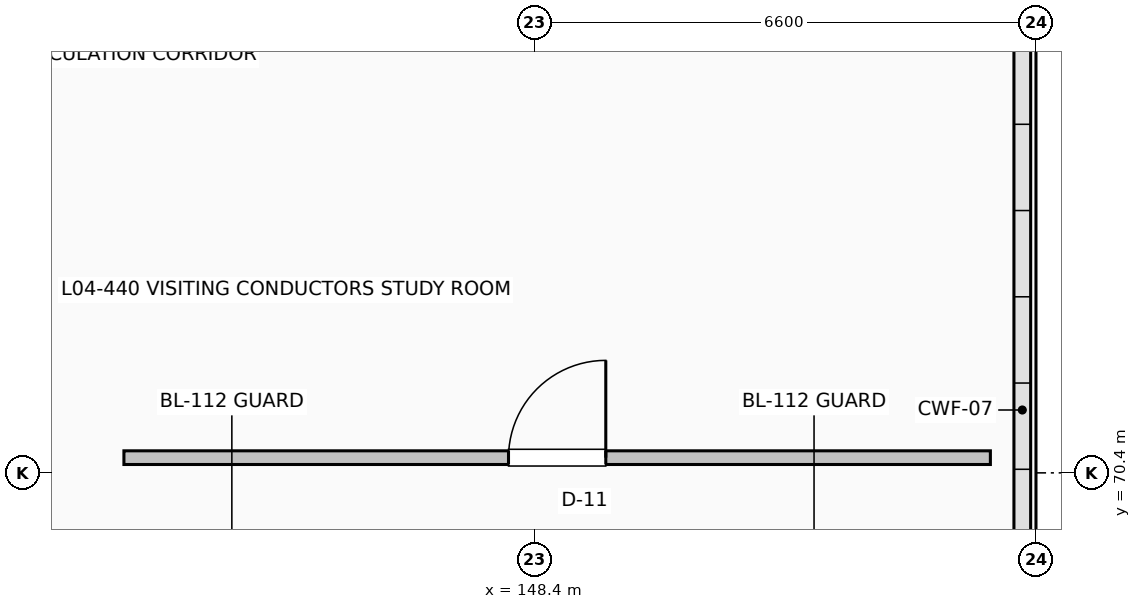
"""IFC4 building model, lengths in metres.
Left out: names, types, materials, properties, quantities, classifications, styles, units other than length and angle.
Written with IfcOpenShell. Run it as: python <this file> out.ifc"""

import sys

from ifc_helpers import new_model, si_unit, direction, frame, frame_2d, origin, place, context, subcontext, project, spatial, rectangle, extrude, element, fill, save


model = new_model("IFC4")
c1 = context("Model", 3, precision=1e-05, world=origin(), true_north=direction((0.0, 1.0)))
c2 = subcontext(c1, "Body", "Model", "MODEL_VIEW")
j1 = project(units=[si_unit("LENGTHUNIT", "METRE"), si_unit("PLANEANGLEUNIT", "RADIAN")], contexts=[c1])
p1 = place(None, origin())
s1 = spatial("IfcSite", under=j1, at=p1, CompositionType="ELEMENT")
p2 = place(p1, origin())
s2 = spatial("IfcBuilding", under=s1, at=p2, CompositionType="ELEMENT")
p3 = place(p2, frame((0.0, 0.0, 19.5)))
s3 = spatial("IfcBuildingStorey", under=s2, at=p3, CompositionType="ELEMENT", Elevation=19.5)
p4 = place(p3, frame((143.0, 70.6, 0.0), z_axis=(0.0, 0.0, 1.0), x_axis=(1.0, 0.0, 0.0)))
e1 = element("IfcWall", 1, at=p4, inside=s3, PredefinedType="PARTITIONING", context=c2, shape_type="SweptSolid", body=[
    extrude(rectangle(XDim=11.4, YDim=0.18, at=frame_2d((5.7, 0.0))), origin(), (0.0, 0.0, 1.0), 4.192),
])
p5 = place(p4, frame((5.06, 0.0, 0.0)))
e2 = element("IfcOpeningElement", 2, at=p5, cuts=e1, PredefinedType="OPENING", context=c2, shape_type="SweptSolid", body=[
    extrude(rectangle(XDim=1.28, YDim=2.14, at=frame_2d((0.64, 1.07))), frame((0.0, 0.1, 0.0), z_axis=(0.0, -1.0, 0.0), x_axis=(1.0, 0.0, 0.0)), (0.0, 0.0, 1.0), 0.2),
])
p6 = place(p5, origin())
e3 = element("IfcDoor", 3, at=p6, inside=s3, OperationType="SINGLE_SWING_RIGHT", PredefinedType="DOOR", context=c2, shape_type="SweptSolid", body=[
    extrude(rectangle(XDim=1.28, YDim=2.14, at=frame_2d((0.64, 1.07))), frame((0.0, 0.025, 0.0), z_axis=(0.0, -1.0, 0.0), x_axis=(1.0, 0.0, 0.0)), (0.0, 0.0, 1.0), 0.05),
])
fill(e2, e3)
save(model, sys.argv[1])
